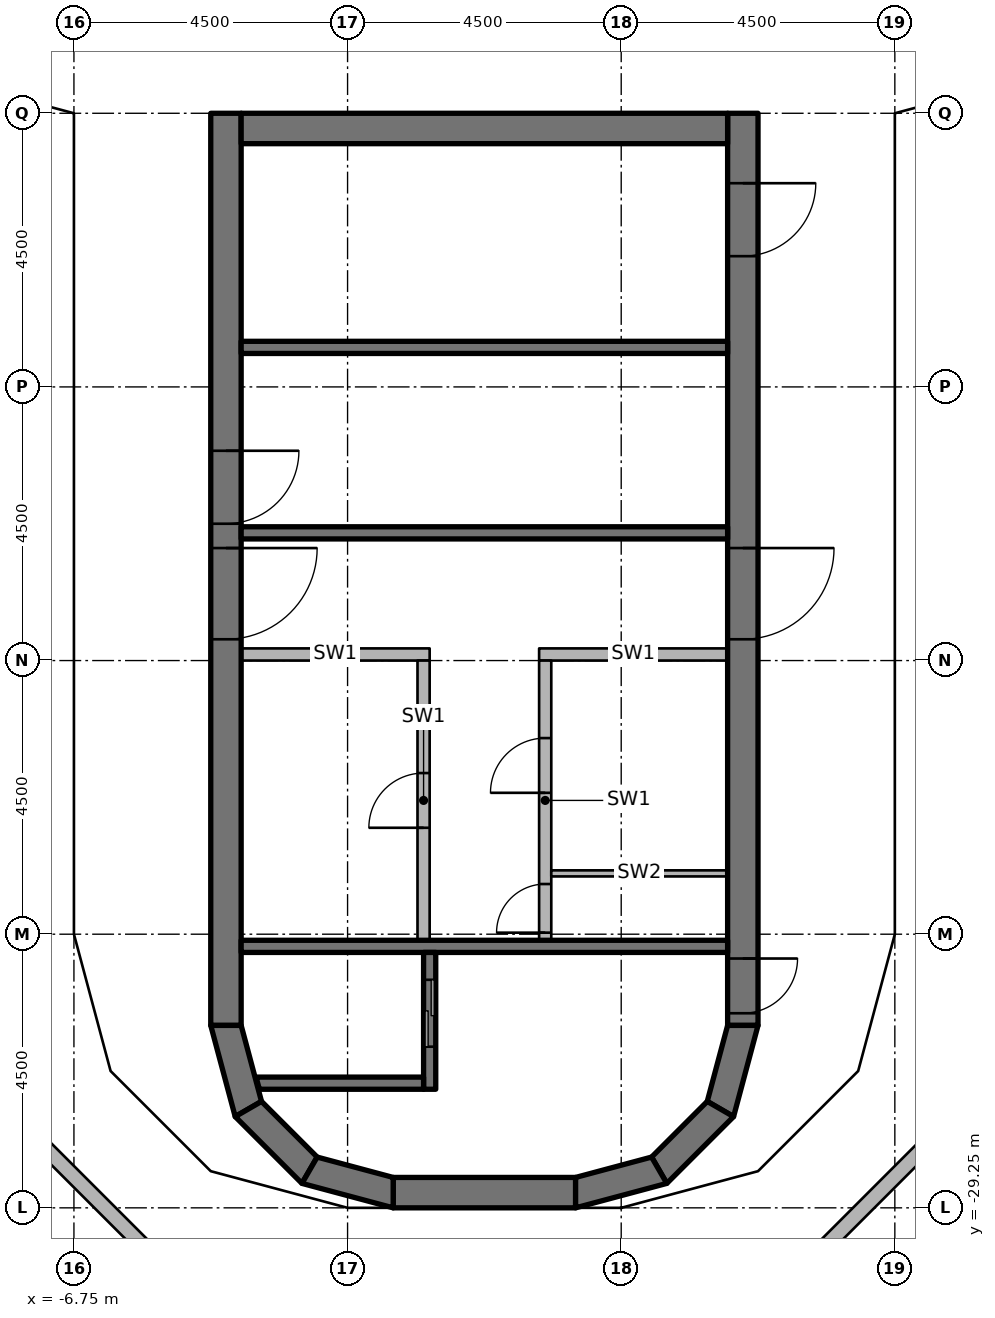
"""IFC4 building model, lengths in metres.
Left out: names, types, materials, properties, quantities, classifications, styles, units other than length and angle.
Written with IfcOpenShell. Run it as: python <this file> out.ifc"""

import sys

from ifc_helpers import new_model, si_unit, direction, frame, frame_2d, origin, origin_2d, place, context, subcontext, project, spatial, polyline, rectangle, outline, extrude, element, fill, save


model = new_model("IFC4")
c1 = context("Model", 3, precision=1e-05, world=origin(), true_north=direction((0.0, 1.0)))
c2 = subcontext(c1, "Body", "Model", "MODEL_VIEW")
j1 = project(units=[si_unit("LENGTHUNIT", "METRE"), si_unit("PLANEANGLEUNIT", "RADIAN")], contexts=[c1])
p1 = place(None, origin())
s1 = spatial("IfcSite", under=j1, at=p1, CompositionType="ELEMENT")
p2 = place(p1, origin())
s2 = spatial("IfcBuilding", under=s1, at=p2, CompositionType="ELEMENT")
p3 = place(p2, frame((0.0, 0.0, 302.4)))
s3 = spatial("IfcBuildingStorey", under=s2, at=p3, CompositionType="ELEMENT", Elevation=302.4)
for number, where, z_axis, x_axis in (
    (1, (-6.25, -24.65, 0.0), (0.0, 0.0, 1.0), (1.0, 0.0, 0.0)),
    (2, (-6.25, -20.25, 0.0), (0.0, 0.0, 1.0), (1.0, 0.0, 0.0)),
    (3, (-6.25, -15.75, 0.0), (0.0, 0.0, 1.0), (1.0, 0.0, 0.0)),
    (4, (-6.25, -10.75, 0.0), (0.0, 0.0, 1.0), (1.0, 0.0, 0.0)),
    (5, (6.25, -24.65, 0.0), (0.0, 0.0, 1.0), (1.0, 0.0, 0.0)),
    (6, (6.25, -20.25, 0.0), (0.0, 0.0, 1.0), (1.0, 0.0, 0.0)),
    (7, (6.25, -15.75, 0.0), (0.0, 0.0, 1.0), (1.0, 0.0, 0.0)),
    (8, (6.25, -10.75, 0.0), (0.0, 0.0, 1.0), (1.0, 0.0, 0.0)),
):
    element("IfcColumn", number, at=place(p3, frame(where, z_axis=z_axis, x_axis=x_axis)), inside=s3, PredefinedType="COLUMN", context=c2, shape_type="SweptSolid", body=[
        extrude(rectangle(XDim=0.6, YDim=0.6, at=origin_2d()), origin(), (0.0, 0.0, 1.0), 3.45),
    ])
p4 = place(p3, frame((-4.25, -11.25, 0.0), z_axis=(0.0, 0.0, 1.0), x_axis=(0.0, -1.0, 0.0)))
e9 = element("IfcWall", 9, at=p4, inside=s3, PredefinedType="SHEAR", context=c2, shape_type="SweptSolid", body=[
    extrude(rectangle(XDim=15.0, YDim=0.5, at=frame_2d((7.5, 0.0))), origin(), (0.0, 0.0, 1.0), 3.6),
])
p5 = place(p4, frame((7.15, 0.0, 0.0)))
e10 = element("IfcOpeningElement", 10, at=p5, cuts=e9, PredefinedType="OPENING", context=c2, shape_type="SweptSolid", body=[
    extrude(rectangle(XDim=1.5, YDim=2.3, at=frame_2d((0.75, 1.15))), frame((0.0, 0.26, 0.0), z_axis=(0.0, -1.0, 0.0), x_axis=(1.0, 0.0, 0.0)), (0.0, 0.0, 1.0), 0.52),
])
p6 = place(p4, frame((5.55, 0.0, 0.0)))
e11 = element("IfcOpeningElement", 11, at=p6, cuts=e9, PredefinedType="OPENING", context=c2, shape_type="SweptSolid", body=[
    extrude(rectangle(XDim=1.2, YDim=2.1, at=frame_2d((0.6, 1.05))), frame((0.0, 0.26, 0.0), z_axis=(0.0, -1.0, 0.0), x_axis=(1.0, 0.0, 0.0)), (0.0, 0.0, 1.0), 0.52),
])
p7 = place(p3, frame((4.25, -11.25, 0.0), z_axis=(0.0, 0.0, 1.0), x_axis=(0.0, -1.0, 0.0)))
e12 = element("IfcWall", 12, at=p7, inside=s3, PredefinedType="SHEAR", context=c2, shape_type="SweptSolid", body=[
    extrude(rectangle(XDim=15.0, YDim=0.5, at=frame_2d((7.5, 0.0))), origin(), (0.0, 0.0, 1.0), 3.6),
])
p8 = place(p7, frame((7.15, 0.0, 0.0)))
e13 = element("IfcOpeningElement", 13, at=p8, cuts=e12, PredefinedType="OPENING", context=c2, shape_type="SweptSolid", body=[
    extrude(rectangle(XDim=1.5, YDim=2.3, at=frame_2d((0.75, 1.15))), frame((0.0, 0.26, 0.0), z_axis=(0.0, -1.0, 0.0), x_axis=(1.0, 0.0, 0.0)), (0.0, 0.0, 1.0), 0.52),
])
p9 = place(p7, frame((13.9, 0.0, 0.0)))
e14 = element("IfcOpeningElement", 14, at=p9, cuts=e12, PredefinedType="OPENING", context=c2, shape_type="SweptSolid", body=[
    extrude(rectangle(XDim=0.9, YDim=2.1, at=frame_2d((0.45, 1.05))), frame((0.0, 0.26, 0.0), z_axis=(0.0, -1.0, 0.0), x_axis=(1.0, 0.0, 0.0)), (0.0, 0.0, 1.0), 0.52),
])
p10 = place(p7, frame((1.15, 0.0, 0.0)))
e15 = element("IfcOpeningElement", 15, at=p10, cuts=e12, PredefinedType="OPENING", context=c2, shape_type="SweptSolid", body=[
    extrude(rectangle(XDim=1.2, YDim=2.1, at=frame_2d((0.6, 1.05))), frame((0.0, 0.26, 0.0), z_axis=(0.0, -1.0, 0.0), x_axis=(1.0, 0.0, 0.0)), (0.0, 0.0, 1.0), 0.52),
])
p11 = place(p3, frame((-4.0, -11.5, 0.0), z_axis=(0.0, 0.0, 1.0), x_axis=(1.0, 0.0, 0.0)))
e16 = element("IfcWall", 16, at=p11, inside=s3, PredefinedType="SHEAR", context=c2, shape_type="SweptSolid", body=[
    extrude(rectangle(XDim=8.0, YDim=0.5, at=frame_2d((4.0, 0.0))), origin(), (0.0, 0.0, 1.0), 3.6),
])
p12 = place(p3, frame((-1.5, -29.0, 0.0), z_axis=(0.0, 0.0, 1.0), x_axis=(1.0, 0.0, 0.0)))
e17 = element("IfcWall", 17, at=p12, inside=s3, PredefinedType="SHEAR", context=c2, shape_type="SweptSolid", body=[
    extrude(rectangle(XDim=3.0, YDim=0.5, at=frame_2d((1.5, 0.0))), origin(), (0.0, 0.0, 1.0), 3.6),
])
p13 = place(p3, origin())
e18 = element("IfcWall", 18, at=p13, inside=s3, PredefinedType="SHEAR", context=c2, shape_type="SweptSolid", body=[
    extrude(outline(polyline([(-4.5, -26.25), (-4.098, -27.75), (-3.665, -27.5), (-4.0, -26.25), (-4.5, -26.25)])), origin(), (0.0, 0.0, 1.0), 3.6),
])
p14 = place(p3, origin())
e19 = element("IfcWall", 19, at=p14, inside=s3, PredefinedType="SHEAR", context=c2, shape_type="SweptSolid", body=[
    extrude(outline(polyline([(-4.098, -27.75), (-3.0, -28.848), (-2.75, -28.415), (-3.665, -27.5), (-4.098, -27.75)])), origin(), (0.0, 0.0, 1.0), 3.6),
])
p15 = place(p3, origin())
e20 = element("IfcWall", 20, at=p15, inside=s3, PredefinedType="SHEAR", context=c2, shape_type="SweptSolid", body=[
    extrude(outline(polyline([(-3.0, -28.848), (-1.5, -29.25), (-1.5, -28.75), (-2.75, -28.415), (-3.0, -28.848)])), origin(), (0.0, 0.0, 1.0), 3.6),
])
p16 = place(p3, origin())
e21 = element("IfcWall", 21, at=p16, inside=s3, PredefinedType="SHEAR", context=c2, shape_type="SweptSolid", body=[
    extrude(outline(polyline([(4.5, -26.25), (4.098, -27.75), (3.665, -27.5), (4.0, -26.25), (4.5, -26.25)])), origin(), (0.0, 0.0, 1.0), 3.6),
])
p17 = place(p3, origin())
e22 = element("IfcWall", 22, at=p17, inside=s3, PredefinedType="SHEAR", context=c2, shape_type="SweptSolid", body=[
    extrude(outline(polyline([(4.098, -27.75), (3.0, -28.848), (2.75, -28.415), (3.665, -27.5), (4.098, -27.75)])), origin(), (0.0, 0.0, 1.0), 3.6),
])
p18 = place(p3, origin())
e23 = element("IfcWall", 23, at=p18, inside=s3, PredefinedType="SHEAR", context=c2, shape_type="SweptSolid", body=[
    extrude(outline(polyline([(3.0, -28.848), (1.5, -29.25), (1.5, -28.75), (2.75, -28.415), (3.0, -28.848)])), origin(), (0.0, 0.0, 1.0), 3.6),
])
p19 = place(p3, origin())
e24 = element("IfcWall", 24, at=p19, inside=s3, PredefinedType="PARAPET", context=c2, shape_type="SweptSolid", body=[
    extrude(outline(polyline([(-5.421, -30.243), (-7.743, -27.921), (-7.519, -27.792), (-5.292, -30.019), (-5.421, -30.243)])), origin(), (0.0, 0.0, 1.0), 1.22),
])
p20 = place(p3, origin())
e25 = element("IfcWall", 25, at=p20, inside=s3, PredefinedType="PARAPET", context=c2, shape_type="SweptSolid", body=[
    extrude(outline(polyline([(7.743, -27.921), (5.421, -30.243), (5.292, -30.019), (7.519, -27.792), (7.743, -27.921)])), origin(), (0.0, 0.0, 1.0), 1.22),
])
p21 = place(p3, frame((4.0, -24.95, 0.0), z_axis=(0.0, 0.0, 1.0), x_axis=(-1.0, 0.0, 0.0)))
e26 = element("IfcWall", 26, at=p21, inside=s3, PredefinedType="SHEAR", context=c2, shape_type="SweptSolid", body=[
    extrude(rectangle(XDim=8.0, YDim=0.2, at=frame_2d((4.0, 0.0))), origin(), (0.0, 0.0, 1.0), 3.45),
])
p22 = place(p3, frame((-0.9, -27.3, 0.0), z_axis=(0.0, 0.0, 1.0), x_axis=(0.0, 1.0, 0.0)))
e27 = element("IfcWall", 27, at=p22, inside=s3, PredefinedType="SHEAR", context=c2, shape_type="SweptSolid", body=[
    extrude(rectangle(XDim=2.25, YDim=0.2, at=frame_2d((1.125, 0.0))), origin(), (0.0, 0.0, 1.0), 3.45),
])
p23 = place(p22, frame((0.7, 0.0, 0.0)))
e28 = element("IfcOpeningElement", 28, at=p23, cuts=e27, PredefinedType="OPENING", context=c2, shape_type="SweptSolid", body=[
    extrude(rectangle(XDim=1.1, YDim=2.3, at=frame_2d((0.55, 1.15))), frame((0.0, 0.11, 0.0), z_axis=(0.0, -1.0, 0.0), x_axis=(1.0, 0.0, 0.0)), (0.0, 0.0, 1.0), 0.22),
])
p24 = place(p3, origin())
e29 = element("IfcWall", 29, at=p24, inside=s3, PredefinedType="SHEAR", context=c2, shape_type="SweptSolid", body=[
    extrude(outline(polyline([(-1.0, -27.1), (-3.755, -27.1), (-3.701, -27.3), (-1.0, -27.3), (-1.0, -27.1)])), origin(), (0.0, 0.0, 1.0), 3.45),
])
for number, where, z_axis, x_axis in (
    (30, (4.0, -18.15, 0.0), (0.0, 0.0, 1.0), (-1.0, 0.0, 0.0)),
    (31, (4.0, -15.1, 0.0), (0.0, 0.0, 1.0), (-1.0, 0.0, 0.0)),
):
    element("IfcWall", number, at=place(p3, frame(where, z_axis=z_axis, x_axis=x_axis)), inside=s3, PredefinedType="SHEAR", context=c2, shape_type="SweptSolid", body=[
        extrude(rectangle(XDim=8.0, YDim=0.2, at=frame_2d((4.0, 0.0))), origin(), (0.0, 0.0, 1.0), 3.45),
    ])
p25 = place(p3, frame((4.0, -20.15, 0.0), z_axis=(0.0, 0.0, 1.0), x_axis=(-1.0, 0.0, 0.0)))
e32 = element("IfcWall", 32, at=p25, inside=s3, PredefinedType="PARTITIONING", context=c2, shape_type="SweptSolid", body=[
    extrude(rectangle(XDim=3.1, YDim=0.2, at=frame_2d((1.55, 0.0))), origin(), (0.0, 0.0, 1.0), 3.45),
])
p26 = place(p3, frame((1.0, -24.85, 0.0), z_axis=(0.0, 0.0, 1.0), x_axis=(0.0, 1.0, 0.0)))
e33 = element("IfcWall", 33, at=p26, inside=s3, PredefinedType="PARTITIONING", context=c2, shape_type="SweptSolid", body=[
    extrude(rectangle(XDim=4.6, YDim=0.2, at=frame_2d((2.3, 0.0))), origin(), (0.0, 0.0, 1.0), 3.45),
])
p27 = place(p26, frame((0.125, 0.0, 0.0)))
e34 = element("IfcOpeningElement", 34, at=p27, cuts=e33, PredefinedType="OPENING", context=c2, shape_type="SweptSolid", body=[
    extrude(rectangle(XDim=0.8, YDim=2.1, at=frame_2d((0.4, 1.05))), frame((0.0, 0.11, 0.0), z_axis=(0.0, -1.0, 0.0), x_axis=(1.0, 0.0, 0.0)), (0.0, 0.0, 1.0), 0.22),
])
p28 = place(p26, frame((2.425, 0.0, 0.0)))
e35 = element("IfcOpeningElement", 35, at=p28, cuts=e33, PredefinedType="OPENING", context=c2, shape_type="SweptSolid", body=[
    extrude(rectangle(XDim=0.9, YDim=2.1, at=frame_2d((0.45, 1.05))), frame((0.0, 0.11, 0.0), z_axis=(0.0, -1.0, 0.0), x_axis=(1.0, 0.0, 0.0)), (0.0, 0.0, 1.0), 0.22),
])
p29 = place(p3, frame((-0.9, -20.15, 0.0), z_axis=(0.0, 0.0, 1.0), x_axis=(-1.0, 0.0, 0.0)))
e36 = element("IfcWall", 36, at=p29, inside=s3, PredefinedType="PARTITIONING", context=c2, shape_type="SweptSolid", body=[
    extrude(rectangle(XDim=3.1, YDim=0.2, at=frame_2d((1.55, 0.0))), origin(), (0.0, 0.0, 1.0), 3.45),
])
p30 = place(p3, frame((-1.0, -24.85, 0.0), z_axis=(0.0, 0.0, 1.0), x_axis=(0.0, 1.0, 0.0)))
e37 = element("IfcWall", 37, at=p30, inside=s3, PredefinedType="PARTITIONING", context=c2, shape_type="SweptSolid", body=[
    extrude(rectangle(XDim=4.6, YDim=0.2, at=frame_2d((2.3, 0.0))), origin(), (0.0, 0.0, 1.0), 3.45),
])
p31 = place(p30, frame((1.85, 0.0, 0.0)))
e38 = element("IfcOpeningElement", 38, at=p31, cuts=e37, PredefinedType="OPENING", context=c2, shape_type="SweptSolid", body=[
    extrude(rectangle(XDim=0.9, YDim=2.1, at=frame_2d((0.45, 1.05))), frame((0.0, 0.11, 0.0), z_axis=(0.0, -1.0, 0.0), x_axis=(1.0, 0.0, 0.0)), (0.0, 0.0, 1.0), 0.22),
])
p32 = place(p3, frame((4.0, -23.75, 0.0), z_axis=(0.0, 0.0, 1.0), x_axis=(-1.0, 0.0, 0.0)))
e39 = element("IfcWall", 39, at=p32, inside=s3, PredefinedType="PARTITIONING", context=c2, shape_type="SweptSolid", body=[
    extrude(rectangle(XDim=2.9, YDim=0.1, at=frame_2d((1.45, 0.0))), origin(), (0.0, 0.0, 1.0), 3.45),
])
p33 = place(p8, origin())
e40 = element("IfcDoor", 40, at=p33, inside=s3, OperationType="DOUBLE_DOOR_SINGLE_SWING", PredefinedType="DOOR", context=c2, shape_type="SweptSolid", body=[
    extrude(rectangle(XDim=1.5, YDim=2.3, at=frame_2d((0.75, 1.15))), frame((0.0, 0.025, 0.0), z_axis=(0.0, -1.0, 0.0), x_axis=(1.0, 0.0, 0.0)), (0.0, 0.0, 1.0), 0.05),
])
fill(e13, e40)
p34 = place(p5, origin())
e41 = element("IfcDoor", 41, at=p34, inside=s3, OperationType="DOUBLE_DOOR_SINGLE_SWING", PredefinedType="DOOR", context=c2, shape_type="SweptSolid", body=[
    extrude(rectangle(XDim=1.5, YDim=2.3, at=frame_2d((0.75, 1.15))), frame((0.0, 0.025, 0.0), z_axis=(0.0, -1.0, 0.0), x_axis=(1.0, 0.0, 0.0)), (0.0, 0.0, 1.0), 0.05),
])
fill(e10, e41)
p35 = place(p9, origin())
e42 = element("IfcDoor", 42, at=p35, inside=s3, OperationType="SINGLE_SWING_RIGHT", PredefinedType="DOOR", context=c2, shape_type="SweptSolid", body=[
    extrude(rectangle(XDim=0.9, YDim=2.1, at=frame_2d((0.45, 1.05))), frame((0.0, 0.025, 0.0), z_axis=(0.0, -1.0, 0.0), x_axis=(1.0, 0.0, 0.0)), (0.0, 0.0, 1.0), 0.05),
])
fill(e14, e42)
p36 = place(p6, origin())
e43 = element("IfcDoor", 43, at=p36, inside=s3, OperationType="SINGLE_SWING_LEFT", PredefinedType="DOOR", context=c2, shape_type="SweptSolid", body=[
    extrude(rectangle(XDim=1.2, YDim=2.1, at=frame_2d((0.6, 1.05))), frame((0.0, 0.025, 0.0), z_axis=(0.0, -1.0, 0.0), x_axis=(1.0, 0.0, 0.0)), (0.0, 0.0, 1.0), 0.05),
])
fill(e11, e43)
p37 = place(p10, origin())
e44 = element("IfcDoor", 44, at=p37, inside=s3, OperationType="SINGLE_SWING_RIGHT", PredefinedType="DOOR", context=c2, shape_type="SweptSolid", body=[
    extrude(rectangle(XDim=1.2, YDim=2.1, at=frame_2d((0.6, 1.05))), frame((0.0, 0.025, 0.0), z_axis=(0.0, -1.0, 0.0), x_axis=(1.0, 0.0, 0.0)), (0.0, 0.0, 1.0), 0.05),
])
fill(e15, e44)
p38 = place(p23, origin())
e45 = element("IfcDoor", 45, at=p38, inside=s3, OperationType="DOUBLE_DOOR_SLIDING", PredefinedType="DOOR", context=c2, shape_type="SweptSolid", body=[
    extrude(rectangle(XDim=1.1, YDim=2.3, at=frame_2d((0.55, 1.15))), frame((0.0, 0.025, 0.0), z_axis=(0.0, -1.0, 0.0), x_axis=(1.0, 0.0, 0.0)), (0.0, 0.0, 1.0), 0.05),
])
fill(e28, e45)
p39 = place(p27, origin())
e46 = element("IfcDoor", 46, at=p39, inside=s3, OperationType="SINGLE_SWING_LEFT", PredefinedType="DOOR", context=c2, shape_type="SweptSolid", body=[
    extrude(rectangle(XDim=0.8, YDim=2.1, at=frame_2d((0.4, 1.05))), frame((0.0, 0.025, 0.0), z_axis=(0.0, -1.0, 0.0), x_axis=(1.0, 0.0, 0.0)), (0.0, 0.0, 1.0), 0.05),
])
fill(e34, e46)
p40 = place(p28, origin())
e47 = element("IfcDoor", 47, at=p40, inside=s3, OperationType="SINGLE_SWING_LEFT", PredefinedType="DOOR", context=c2, shape_type="SweptSolid", body=[
    extrude(rectangle(XDim=0.9, YDim=2.1, at=frame_2d((0.45, 1.05))), frame((0.0, 0.025, 0.0), z_axis=(0.0, -1.0, 0.0), x_axis=(1.0, 0.0, 0.0)), (0.0, 0.0, 1.0), 0.05),
])
fill(e35, e47)
p41 = place(p31, origin())
e48 = element("IfcDoor", 48, at=p41, inside=s3, OperationType="SINGLE_SWING_LEFT", PredefinedType="DOOR", context=c2, shape_type="SweptSolid", body=[
    extrude(rectangle(XDim=0.9, YDim=2.1, at=frame_2d((0.45, 1.05))), frame((0.0, 0.025, 0.0), z_axis=(0.0, -1.0, 0.0), x_axis=(1.0, 0.0, 0.0)), (0.0, 0.0, 1.0), 0.05),
])
fill(e38, e48)
save(model, sys.argv[1])
